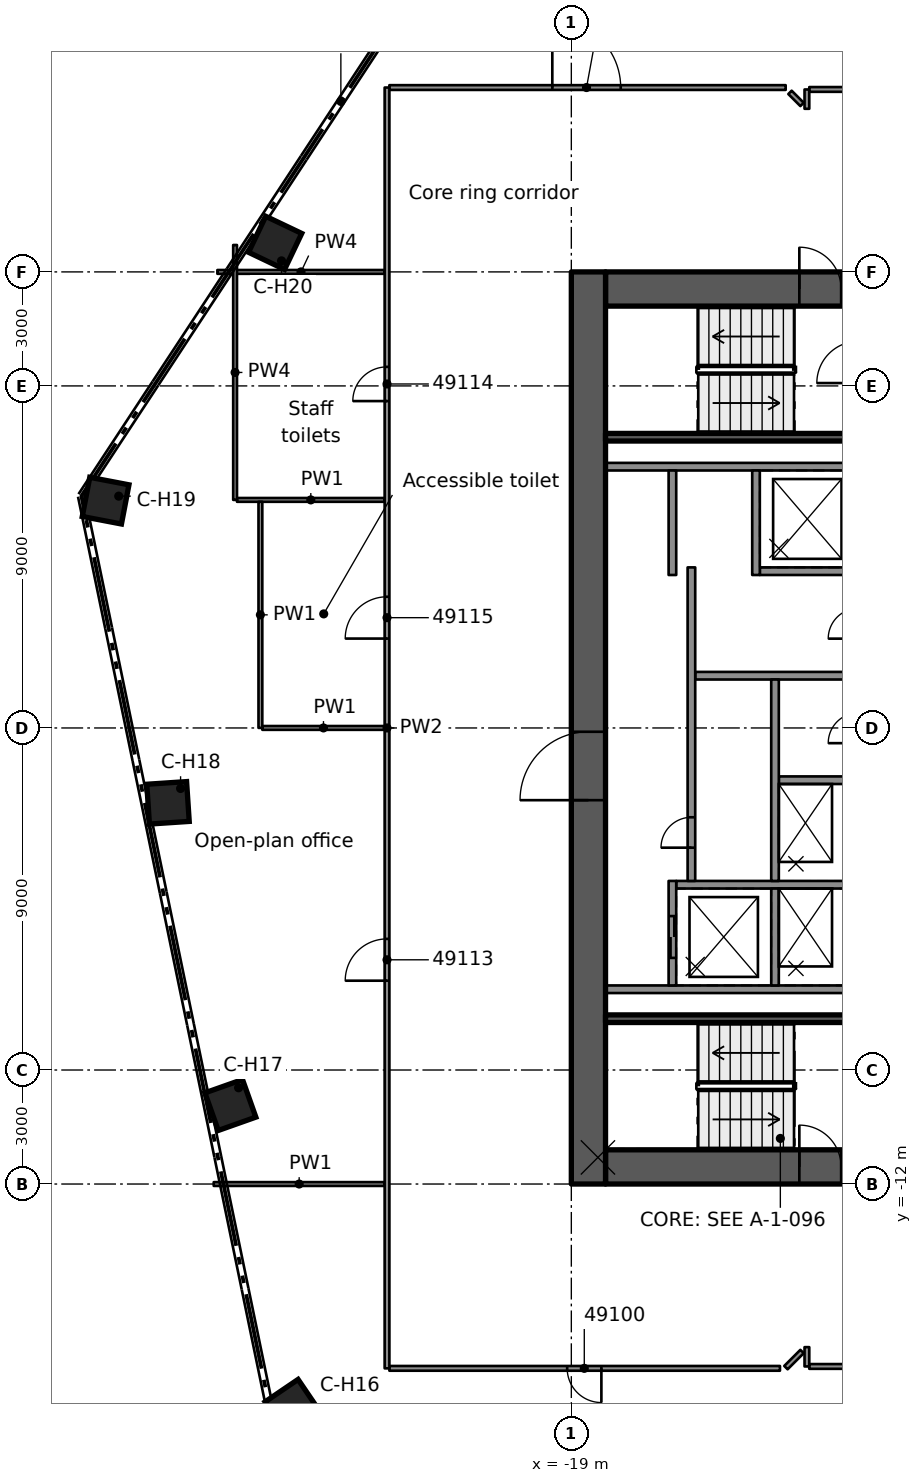
"""IFC4 building model, lengths in metres.
Left out: names, types, materials, properties, quantities, classifications, styles, units other than length and angle.
Written with IfcOpenShell. Run it as: python <this file> out.ifc"""

import sys

from ifc_helpers import new_model, si_unit, direction, frame, frame_2d, origin, origin_2d, place, context, subcontext, project, spatial, rectangle, extrude, element, fill, save


model = new_model("IFC4")
c1 = context("Model", 3, precision=1e-05, world=origin(), true_north=direction((0.0, 1.0)))
c2 = subcontext(c1, "Body", "Model", "MODEL_VIEW")
j1 = project(units=[si_unit("LENGTHUNIT", "METRE"), si_unit("PLANEANGLEUNIT", "RADIAN")], contexts=[c1])
p1 = place(None, origin())
s1 = spatial("IfcSite", under=j1, at=p1, CompositionType="ELEMENT")
p2 = place(p1, origin())
s2 = spatial("IfcBuilding", under=s1, at=p2, CompositionType="ELEMENT")
p3 = place(p2, frame((0.0, 0.0, 246.0)))
s3 = spatial("IfcBuildingStorey", under=s2, at=p3, CompositionType="ELEMENT", Elevation=246.0)
p4 = place(p3, frame((-18.1, 11.55, 0.0), z_axis=(0.0, 0.0, 1.0), x_axis=(1.0, 0.0, 0.0)))
e1 = element("IfcWall", 1, at=p4, inside=s3, PredefinedType="SHEAR", context=c2, shape_type="SweptSolid", body=[
    extrude(rectangle(XDim=9.2, YDim=0.9, at=frame_2d((4.6, 0.0))), origin(), (0.0, 0.0, 1.0), 3.5),
])
p5 = place(p4, frame((5.1, 0.0, 0.0)))
e2 = element("IfcOpeningElement", 2, at=p5, cuts=e1, PredefinedType="OPENING", context=c2, shape_type="SweptSolid", body=[
    extrude(rectangle(XDim=1.1, YDim=2.1, at=frame_2d((0.55, 1.05))), frame((0.0, 0.46, 0.0), z_axis=(0.0, -1.0, 0.0), x_axis=(1.0, 0.0, 0.0)), (0.0, 0.0, 1.0), 0.92),
])
p6 = place(p3, frame((-18.1, -11.55, 0.0), z_axis=(0.0, 0.0, 1.0), x_axis=(1.0, 0.0, 0.0)))
e3 = element("IfcWall", 3, at=p6, inside=s3, PredefinedType="SHEAR", context=c2, shape_type="SweptSolid", body=[
    extrude(rectangle(XDim=9.2, YDim=0.9, at=frame_2d((4.6, 0.0))), origin(), (0.0, 0.0, 1.0), 3.5),
])
p7 = place(p6, frame((5.1, 0.0, 0.0)))
e4 = element("IfcOpeningElement", 4, at=p7, cuts=e3, PredefinedType="OPENING", context=c2, shape_type="SweptSolid", body=[
    extrude(rectangle(XDim=1.1, YDim=2.1, at=frame_2d((0.55, 1.05))), frame((0.0, 0.46, 0.0), z_axis=(0.0, -1.0, 0.0), x_axis=(1.0, 0.0, 0.0)), (0.0, 0.0, 1.0), 0.92),
])
p8 = place(p6, frame((7.53, 0.0, 0.0)))
e5 = element("IfcOpeningElement", 5, at=p8, cuts=e3, PredefinedType="OPENING", context=c2, shape_type="SweptSolid", body=[
    extrude(rectangle(XDim=0.9, YDim=2.1, at=frame_2d((0.45, 1.05))), frame((0.0, 0.46, 0.0), z_axis=(0.0, -1.0, 0.0), x_axis=(1.0, 0.0, 0.0)), (0.0, 0.0, 1.0), 0.92),
])
p9 = place(p3, frame((-18.55, -12.0, 0.0), z_axis=(0.0, 0.0, 1.0), x_axis=(0.0, 1.0, 0.0)))
e6 = element("IfcWall", 6, at=p9, inside=s3, PredefinedType="SHEAR", context=c2, shape_type="SweptSolid", body=[
    extrude(rectangle(XDim=24.0, YDim=0.9, at=frame_2d((12.0, 0.0))), origin(), (0.0, 0.0, 1.0), 3.5),
])
p10 = place(p9, frame((10.1, 0.0, 0.0)))
e7 = element("IfcOpeningElement", 7, at=p10, cuts=e6, PredefinedType="OPENING", context=c2, shape_type="SweptSolid", body=[
    extrude(rectangle(XDim=1.8, YDim=2.1, at=frame_2d((0.9, 1.05))), frame((0.0, 0.46, 0.0), z_axis=(0.0, -1.0, 0.0), x_axis=(1.0, 0.0, 0.0)), (0.0, 0.0, 1.0), 0.92),
])
for number, where, z_axis, x_axis in (
    (8, (-26.33, -17.871, 0.0), (0.0, 0.0, 1.0), (-0.827, -0.562, 0.0)),
    (9, (-27.972, -9.921, 0.0), (0.0, 0.0, 1.0), (-0.942, -0.334, 0.0)),
    (10, (-29.613, -1.97, 0.0), (0.0, 0.0, 1.0), (-0.998, -0.066, 0.0)),
    (11, (-31.255, 5.981, 0.0), (0.0, 0.0, 1.0), (-0.982, 0.188, 0.0)),
    (12, (-26.794, 12.764, 0.0), (0.0, 0.0, 1.0), (-0.903, 0.43, 0.0)),
):
    element("IfcColumn", number, at=place(p3, frame(where, z_axis=z_axis, x_axis=x_axis)), inside=s3, PredefinedType="COLUMN", context=c2, shape_type="SweptSolid", body=[
        extrude(rectangle(XDim=1.05, YDim=1.05, at=origin_2d()), origin(), (0.0, 0.0, 1.0), 3.5),
    ])
for number, where, z_axis, x_axis in (
    (13, (-11.54, 6.875, 0.0), (0.0, 0.0, 1.0), (-1.0, 0.0, 0.0)),
    (14, (-11.54, -6.875, 0.0), (0.0, 0.0, 1.0), (-1.0, 0.0, 0.0)),
):
    element("IfcWall", number, at=place(p3, frame(where, z_axis=z_axis, x_axis=x_axis)), inside=s3, PredefinedType="SOLIDWALL", context=c2, shape_type="SweptSolid", body=[
        extrude(rectangle(XDim=6.56, YDim=0.2, at=frame_2d((3.28, 0.0))), origin(), (0.0, 0.0, 1.0), 3.08),
    ])
p11 = place(p3, frame((-11.54, -4.125, 0.0), z_axis=(0.0, 0.0, 1.0), x_axis=(-1.0, 0.0, 0.0)))
e15 = element("IfcWall", 15, at=p11, inside=s3, PredefinedType="SOLIDWALL", context=c2, shape_type="SweptSolid", body=[
    extrude(rectangle(XDim=4.7, YDim=0.2, at=frame_2d((2.35, 0.0))), origin(), (0.0, 0.0, 1.0), 3.08),
])
p12 = place(p3, frame((-11.54, -1.375, 0.0), z_axis=(0.0, 0.0, 1.0), x_axis=(-1.0, 0.0, 0.0)))
e16 = element("IfcWall", 16, at=p12, inside=s3, PredefinedType="SOLIDWALL", context=c2, shape_type="SweptSolid", body=[
    extrude(rectangle(XDim=2.0, YDim=0.2, at=frame_2d((1.0, 0.0))), origin(), (0.0, 0.0, 1.0), 3.08),
])
p13 = place(p3, frame((-11.54, 1.375, 0.0), z_axis=(0.0, 0.0, 1.0), x_axis=(-1.0, 0.0, 0.0)))
e17 = element("IfcWall", 17, at=p13, inside=s3, PredefinedType="SOLIDWALL", context=c2, shape_type="SweptSolid", body=[
    extrude(rectangle(XDim=4.2, YDim=0.2, at=frame_2d((2.1, 0.0))), origin(), (0.0, 0.0, 1.0), 3.08),
])
p14 = place(p3, frame((-11.54, 4.125, 0.0), z_axis=(0.0, 0.0, 1.0), x_axis=(-1.0, 0.0, 0.0)))
e18 = element("IfcWall", 18, at=p14, inside=s3, PredefinedType="SOLIDWALL", context=c2, shape_type="SweptSolid", body=[
    extrude(rectangle(XDim=2.5, YDim=0.2, at=frame_2d((1.25, 0.0))), origin(), (0.0, 0.0, 1.0), 3.08),
])
p15 = place(p3, frame((-13.64, -6.775, 0.0), z_axis=(0.0, 0.0, 1.0), x_axis=(0.0, 1.0, 0.0)))
e19 = element("IfcWall", 19, at=p15, inside=s3, PredefinedType="SOLIDWALL", context=c2, shape_type="SweptSolid", body=[
    extrude(rectangle(XDim=2.55, YDim=0.2, at=frame_2d((1.275, 0.0))), origin(), (0.0, 0.0, 1.0), 3.08),
])
p16 = place(p3, frame((-13.64, -4.025, 0.0), z_axis=(0.0, 0.0, 1.0), x_axis=(0.0, 1.0, 0.0)))
e20 = element("IfcWall", 20, at=p16, inside=s3, PredefinedType="SOLIDWALL", context=c2, shape_type="SweptSolid", body=[
    extrude(rectangle(XDim=5.3, YDim=0.2, at=frame_2d((2.65, 0.0))), origin(), (0.0, 0.0, 1.0), 3.08),
])
p17 = place(p3, frame((-14.14, 4.025, 0.0), z_axis=(0.0, 0.0, 1.0), x_axis=(0.0, 1.0, 0.0)))
e21 = element("IfcWall", 21, at=p17, inside=s3, PredefinedType="SOLIDWALL", context=c2, shape_type="SweptSolid", body=[
    extrude(rectangle(XDim=2.75, YDim=0.2, at=frame_2d((1.375, 0.0))), origin(), (0.0, 0.0, 1.0), 3.08),
])
p18 = place(p3, frame((-16.34, -6.775, 0.0), z_axis=(0.0, 0.0, 1.0), x_axis=(0.0, 1.0, 0.0)))
e22 = element("IfcWall", 22, at=p18, inside=s3, PredefinedType="SOLIDWALL", context=c2, shape_type="SweptSolid", body=[
    extrude(rectangle(XDim=2.75, YDim=0.2, at=frame_2d((1.375, 0.0))), origin(), (0.0, 0.0, 1.0), 3.08),
])
p19 = place(p18, frame((0.725, 0.0, 0.0)))
e23 = element("IfcOpeningElement", 23, at=p19, cuts=e22, PredefinedType="OPENING", context=c2, shape_type="SweptSolid", body=[
    extrude(rectangle(XDim=1.1, YDim=2.1, at=frame_2d((0.55, 1.05))), frame((0.0, 0.11, 0.0), z_axis=(0.0, -1.0, 0.0), x_axis=(1.0, 0.0, 0.0)), (0.0, 0.0, 1.0), 0.22),
])
p20 = place(p3, frame((-15.84, -4.025, 0.0), z_axis=(0.0, 0.0, 1.0), x_axis=(0.0, 1.0, 0.0)))
e24 = element("IfcWall", 24, at=p20, inside=s3, PredefinedType="SOLIDWALL", context=c2, shape_type="SweptSolid", body=[
    extrude(rectangle(XDim=8.25, YDim=0.2, at=frame_2d((4.125, 0.0))), origin(), (0.0, 0.0, 1.0), 3.08),
])
p21 = place(p20, frame((0.875, 0.0, 0.0)))
e25 = element("IfcOpeningElement", 25, at=p21, cuts=e24, PredefinedType="OPENING", context=c2, shape_type="SweptSolid", body=[
    extrude(rectangle(XDim=0.8, YDim=2.1, at=frame_2d((0.4, 1.05))), frame((0.0, 0.11, 0.0), z_axis=(0.0, -1.0, 0.0), x_axis=(1.0, 0.0, 0.0)), (0.0, 0.0, 1.0), 0.22),
])
p22 = place(p3, frame((-16.34, 4.025, 0.0), z_axis=(0.0, 0.0, 1.0), x_axis=(0.0, 1.0, 0.0)))
e26 = element("IfcWall", 26, at=p22, inside=s3, PredefinedType="SOLIDWALL", context=c2, shape_type="SweptSolid", body=[
    extrude(rectangle(XDim=2.75, YDim=0.2, at=frame_2d((1.375, 0.0))), origin(), (0.0, 0.0, 1.0), 3.08),
])
for number, where, z_axis, x_axis in (
    (27, (-11.54, 7.65, 0.0), (0.0, 0.0, 1.0), (-1.0, 0.0, 0.0)),
    (28, (-11.54, -7.65, 0.0), (0.0, 0.0, 1.0), (-1.0, 0.0, 0.0)),
):
    element("IfcWall", number, at=place(p3, frame(where, z_axis=z_axis, x_axis=x_axis)), inside=s3, PredefinedType="SOLIDWALL", context=c2, shape_type="SweptSolid", body=[
        extrude(rectangle(XDim=6.56, YDim=0.2, at=frame_2d((3.28, 0.0))), origin(), (0.0, 0.0, 1.0), 3.08),
    ])
p23 = place(p3, frame((-13.246, 16.724, 0.0), z_axis=(0.0, 0.0, 1.0), x_axis=(0.707106781187, -0.707106781187, 0.0)))
e29 = element("IfcWall", 29, at=p23, inside=s3, PredefinedType="PARTITIONING", context=c2, shape_type="SweptSolid", body=[
    extrude(rectangle(XDim=0.448, YDim=0.125, at=frame_2d((0.224, 0.0))), origin(), (0.0, 0.0, 1.0), 3.06),
])
p24 = place(p3, frame((-13.51, -16.85, 0.0), z_axis=(0.0, 0.0, 1.0), x_axis=(-1.0, 0.0, 0.0)))
e30 = element("IfcWall", 30, at=p24, inside=s3, PredefinedType="PARTITIONING", context=c2, shape_type="SweptSolid", body=[
    extrude(rectangle(XDim=10.278, YDim=0.125, at=frame_2d((5.139, 0.0))), origin(), (0.0, 0.0, 1.0), 3.06),
])
p25 = place(p24, frame((4.699, 0.0, 0.0)))
e31 = element("IfcOpeningElement", 31, at=p25, cuts=e30, PredefinedType="OPENING", context=c2, shape_type="SweptSolid", body=[
    extrude(rectangle(XDim=0.9, YDim=2.1, at=frame_2d((0.45, 1.05))), frame((0.0, 0.073, 0.0), z_axis=(0.0, -1.0, 0.0), x_axis=(1.0, 0.0, 0.0)), (0.0, 0.0, 1.0), 0.145),
])
p26 = place(p3, frame((12.739, -16.8, 0.0), z_axis=(0.0, 0.0, 1.0), x_axis=(-1.0, 0.0, 0.0)))
e32 = element("IfcWall", 32, at=p26, inside=s3, PredefinedType="PARTITIONING", context=c2, shape_type="SweptSolid", body=[
    extrude(rectangle(XDim=25.478, YDim=0.125, at=frame_2d((12.739, 0.0))), origin(), (0.0, 0.0, 1.0), 3.06),
])
p27 = place(p26, frame((15.088, 0.0, 0.0)))
e33 = element("IfcOpeningElement", 33, at=p27, cuts=e32, PredefinedType="OPENING", context=c2, shape_type="SweptSolid", body=[
    extrude(rectangle(XDim=1.8, YDim=2.1, at=frame_2d((0.9, 1.05))), frame((0.0, 0.073, 0.0), z_axis=(0.0, -1.0, 0.0), x_axis=(1.0, 0.0, 0.0)), (0.0, 0.0, 1.0), 0.145),
])
p28 = place(p26, frame((9.189, 0.0, 0.0)))
e34 = element("IfcOpeningElement", 34, at=p28, cuts=e32, PredefinedType="OPENING", context=c2, shape_type="SweptSolid", body=[
    extrude(rectangle(XDim=0.9, YDim=2.1, at=frame_2d((0.45, 1.05))), frame((0.0, 0.073, 0.0), z_axis=(0.0, -1.0, 0.0), x_axis=(1.0, 0.0, 0.0)), (0.0, 0.0, 1.0), 0.145),
])
p29 = place(p3, frame((-28.41, -12.0, 0.0), z_axis=(0.0, 0.0, 1.0), x_axis=(1.0, 0.0, 0.0)))
e35 = element("IfcWall", 35, at=p29, inside=s3, PredefinedType="PARTITIONING", context=c2, shape_type="SweptSolid", body=[
    extrude(rectangle(XDim=4.497, YDim=0.1, at=frame_2d((2.249, 0.0))), origin(), (0.0, 0.0, 1.0), 3.06),
])
p30 = place(p3, frame((-27.131, 0.001, 0.0), z_axis=(0.0, 0.0, 1.0), x_axis=(1.0, 0.0, 0.0)))
e36 = element("IfcWall", 36, at=p30, inside=s3, PredefinedType="PARTITIONING", context=c2, shape_type="SweptSolid", body=[
    extrude(rectangle(XDim=3.218, YDim=0.1, at=frame_2d((1.609, 0.0))), origin(), (0.0, 0.0, 1.0), 3.06),
])
p31 = place(p3, frame((-27.798, 6.001, 0.0), z_axis=(0.0, 0.0, 1.0), x_axis=(1.0, 0.0, 0.0)))
e37 = element("IfcWall", 37, at=p31, inside=s3, PredefinedType="PARTITIONING", context=c2, shape_type="SweptSolid", body=[
    extrude(rectangle(XDim=3.885, YDim=0.1, at=frame_2d((1.942, 0.0))), origin(), (0.0, 0.0, 1.0), 3.06),
])
p32 = place(p3, frame((-28.314, 12.0, 0.0), z_axis=(0.0, 0.0, 1.0), x_axis=(1.0, 0.0, 0.0)))
e38 = element("IfcWall", 38, at=p32, inside=s3, PredefinedType="PARTITIONING", context=c2, shape_type="SweptSolid", body=[
    extrude(rectangle(XDim=4.401, YDim=0.1, at=frame_2d((2.2, 0.0))), origin(), (0.0, 0.0, 1.0), 2.425),
])
p33 = place(p3, frame((-12.738, 16.801, 0.0), z_axis=(0.0, 0.0, 1.0), x_axis=(1.0, 0.0, 0.0)))
e39 = element("IfcWall", 39, at=p33, inside=s3, PredefinedType="PARTITIONING", context=c2, shape_type="SweptSolid", body=[
    extrude(rectangle(XDim=25.476, YDim=0.125, at=frame_2d((12.738, 0.0))), origin(), (0.0, 0.0, 1.0), 3.06),
])
p34 = place(p33, frame((15.337, 0.0, 0.0)))
e40 = element("IfcOpeningElement", 40, at=p34, cuts=e39, PredefinedType="OPENING", context=c2, shape_type="SweptSolid", body=[
    extrude(rectangle(XDim=1.1, YDim=2.1, at=frame_2d((0.55, 1.05))), frame((0.0, 0.073, 0.0), z_axis=(0.0, -1.0, 0.0), x_axis=(1.0, 0.0, 0.0)), (0.0, 0.0, 1.0), 0.145),
])
p35 = place(p33, frame((8.938, 0.0, 0.0)))
e41 = element("IfcOpeningElement", 41, at=p35, cuts=e39, PredefinedType="OPENING", context=c2, shape_type="SweptSolid", body=[
    extrude(rectangle(XDim=1.1, YDim=2.1, at=frame_2d((0.55, 1.05))), frame((0.0, 0.073, 0.0), z_axis=(0.0, -1.0, 0.0), x_axis=(1.0, 0.0, 0.0)), (0.0, 0.0, 1.0), 0.145),
])
p36 = place(p3, frame((-23.788, 16.851, 0.0), z_axis=(0.0, 0.0, 1.0), x_axis=(1.0, 0.0, 0.0)))
e42 = element("IfcWall", 42, at=p36, inside=s3, PredefinedType="PARTITIONING", context=c2, shape_type="SweptSolid", body=[
    extrude(rectangle(XDim=10.428, YDim=0.125, at=frame_2d((5.214, 0.0))), origin(), (0.0, 0.0, 1.0), 3.06),
])
p37 = place(p36, frame((4.288, 0.0, 0.0)))
e43 = element("IfcOpeningElement", 43, at=p37, cuts=e42, PredefinedType="OPENING", context=c2, shape_type="SweptSolid", body=[
    extrude(rectangle(XDim=1.8, YDim=2.1, at=frame_2d((0.9, 1.05))), frame((0.0, 0.073, 0.0), z_axis=(0.0, -1.0, 0.0), x_axis=(1.0, 0.0, 0.0)), (0.0, 0.0, 1.0), 0.145),
])
p38 = place(p3, frame((-13.353, -16.831, 0.0), z_axis=(0.0, 0.0, 1.0), x_axis=(0.707106781187, 0.707106781187, 0.0)))
e44 = element("IfcWall", 44, at=p38, inside=s3, PredefinedType="PARTITIONING", context=c2, shape_type="SweptSolid", body=[
    extrude(rectangle(XDim=0.6, YDim=0.125, at=frame_2d((0.3, 0.0))), origin(), (0.0, 0.0, 1.0), 3.06),
])
for number, where, z_axis, x_axis in (
    (45, (-12.801, -16.8, 0.0), (0.0, 0.0, 1.0), (0.0, 1.0, 0.0)),
    (46, (-12.801, 16.292, 0.0), (0.0, 0.0, 1.0), (0.0, 1.0, 0.0)),
):
    element("IfcWall", number, at=place(p3, frame(where, z_axis=z_axis, x_axis=x_axis)), inside=s3, PredefinedType="PARTITIONING", context=c2, shape_type="SweptSolid", body=[
        extrude(rectangle(XDim=0.508, YDim=0.125, at=frame_2d((0.254, 0.0))), origin(), (0.0, 0.0, 1.0), 3.06),
    ])
p39 = place(p3, frame((-23.85, -16.85, 0.0), z_axis=(0.0, 0.0, 1.0), x_axis=(0.0, 1.0, 0.0)))
e47 = element("IfcWall", 47, at=p39, inside=s3, PredefinedType="PARTITIONING", context=c2, shape_type="SweptSolid", body=[
    extrude(rectangle(XDim=33.701, YDim=0.125, at=frame_2d((16.851, 0.0))), origin(), (0.0, 0.0, 1.0), 3.06),
])
p40 = place(p39, frame((10.2, 0.0, 0.0)))
e48 = element("IfcOpeningElement", 48, at=p40, cuts=e47, PredefinedType="OPENING", context=c2, shape_type="SweptSolid", body=[
    extrude(rectangle(XDim=1.1, YDim=2.1, at=frame_2d((0.55, 1.05))), frame((0.0, 0.073, 0.0), z_axis=(0.0, -1.0, 0.0), x_axis=(1.0, 0.0, 0.0)), (0.0, 0.0, 1.0), 0.145),
])
p41 = place(p39, frame((25.451, 0.0, 0.0)))
e49 = element("IfcOpeningElement", 49, at=p41, cuts=e47, PredefinedType="OPENING", context=c2, shape_type="SweptSolid", body=[
    extrude(rectangle(XDim=0.9, YDim=2.1, at=frame_2d((0.45, 1.05))), frame((0.0, 0.073, 0.0), z_axis=(0.0, -1.0, 0.0), x_axis=(1.0, 0.0, 0.0)), (0.0, 0.0, 1.0), 0.145),
])
p42 = place(p39, frame((19.202, 0.0, 0.0)))
e50 = element("IfcOpeningElement", 50, at=p42, cuts=e47, PredefinedType="OPENING", context=c2, shape_type="SweptSolid", body=[
    extrude(rectangle(XDim=1.1, YDim=2.1, at=frame_2d((0.55, 1.05))), frame((0.0, 0.073, 0.0), z_axis=(0.0, -1.0, 0.0), x_axis=(1.0, 0.0, 0.0)), (0.0, 0.0, 1.0), 0.145),
])
p43 = place(p3, frame((-27.182, 0.002, 0.0), z_axis=(0.0, 0.0, 1.0), x_axis=(0.0, 1.0, 0.0)))
e51 = element("IfcWall", 51, at=p43, inside=s3, PredefinedType="PARTITIONING", context=c2, shape_type="SweptSolid", body=[
    extrude(rectangle(XDim=5.949, YDim=0.1, at=frame_2d((2.975, 0.0))), origin(), (0.0, 0.0, 1.0), 3.06),
])
p44 = place(p3, frame((-27.848, 6.001, 0.0), z_axis=(0.0, 0.0, 1.0), x_axis=(0.0, 1.0, 0.0)))
e52 = element("IfcWall", 52, at=p44, inside=s3, PredefinedType="PARTITIONING", context=c2, shape_type="SweptSolid", body=[
    extrude(rectangle(XDim=6.707, YDim=0.1, at=frame_2d((3.354, 0.0))), origin(), (0.0, 0.0, 1.0), 2.425),
])
p45 = place(p19, origin())
e53 = element("IfcDoor", 53, at=p45, inside=s3, OperationType="DOUBLE_DOOR_SLIDING", PredefinedType="DOOR", context=c2, shape_type="SweptSolid", body=[
    extrude(rectangle(XDim=1.1, YDim=2.1, at=frame_2d((0.55, 1.05))), frame((0.0, 0.025, 0.0), z_axis=(0.0, -1.0, 0.0), x_axis=(1.0, 0.0, 0.0)), (0.0, 0.0, 1.0), 0.05),
])
fill(e23, e53)
p46 = place(p21, origin())
e54 = element("IfcDoor", 54, at=p46, inside=s3, OperationType="SINGLE_SWING_LEFT", PredefinedType="DOOR", context=c2, shape_type="SweptSolid", body=[
    extrude(rectangle(XDim=0.8, YDim=2.1, at=frame_2d((0.4, 1.05))), frame((0.0, 0.025, 0.0), z_axis=(0.0, -1.0, 0.0), x_axis=(1.0, 0.0, 0.0)), (0.0, 0.0, 1.0), 0.05),
])
fill(e25, e54)
p47 = place(p10, origin())
e55 = element("IfcDoor", 55, at=p47, inside=s3, OperationType="SINGLE_SWING_LEFT", PredefinedType="DOOR", context=c2, shape_type="SweptSolid", body=[
    extrude(rectangle(XDim=1.8, YDim=2.1, at=frame_2d((0.9, 1.05))), frame((0.0, 0.025, 0.0), z_axis=(0.0, -1.0, 0.0), x_axis=(1.0, 0.0, 0.0)), (0.0, 0.0, 1.0), 0.05),
])
fill(e7, e55)
p48 = place(p5, origin())
e56 = element("IfcDoor", 56, at=p48, inside=s3, OperationType="SINGLE_SWING_RIGHT", PredefinedType="DOOR", context=c2, shape_type="SweptSolid", body=[
    extrude(rectangle(XDim=1.1, YDim=2.1, at=frame_2d((0.55, 1.05))), frame((0.0, 0.025, 0.0), z_axis=(0.0, -1.0, 0.0), x_axis=(1.0, 0.0, 0.0)), (0.0, 0.0, 1.0), 0.05),
])
fill(e2, e56)
p49 = place(p7, origin())
e57 = element("IfcDoor", 57, at=p49, inside=s3, OperationType="SINGLE_SWING_RIGHT", PredefinedType="DOOR", context=c2, shape_type="SweptSolid", body=[
    extrude(rectangle(XDim=1.1, YDim=2.1, at=frame_2d((0.55, 1.05))), frame((0.0, 0.025, 0.0), z_axis=(0.0, -1.0, 0.0), x_axis=(1.0, 0.0, 0.0)), (0.0, 0.0, 1.0), 0.05),
])
fill(e4, e57)
p50 = place(p25, origin())
e58 = element("IfcDoor", 58, at=p50, inside=s3, OperationType="SINGLE_SWING_RIGHT", PredefinedType="DOOR", context=c2, shape_type="SweptSolid", body=[
    extrude(rectangle(XDim=0.9, YDim=2.1, at=frame_2d((0.45, 1.05))), frame((0.0, 0.025, 0.0), z_axis=(0.0, -1.0, 0.0), x_axis=(1.0, 0.0, 0.0)), (0.0, 0.0, 1.0), 0.05),
])
fill(e31, e58)
p51 = place(p37, origin())
e59 = element("IfcDoor", 59, at=p51, inside=s3, OperationType="DOUBLE_DOOR_SINGLE_SWING", PredefinedType="DOOR", context=c2, shape_type="SweptSolid", body=[
    extrude(rectangle(XDim=1.8, YDim=2.1, at=frame_2d((0.9, 1.05))), frame((0.0, 0.025, 0.0), z_axis=(0.0, -1.0, 0.0), x_axis=(1.0, 0.0, 0.0)), (0.0, 0.0, 1.0), 0.05),
])
fill(e43, e59)
p52 = place(p40, origin())
e60 = element("IfcDoor", 60, at=p52, inside=s3, OperationType="SINGLE_SWING_LEFT", PredefinedType="DOOR", context=c2, shape_type="SweptSolid", body=[
    extrude(rectangle(XDim=1.1, YDim=2.1, at=frame_2d((0.55, 1.05))), frame((0.0, 0.025, 0.0), z_axis=(0.0, -1.0, 0.0), x_axis=(1.0, 0.0, 0.0)), (0.0, 0.0, 1.0), 0.05),
])
fill(e48, e60)
p53 = place(p41, origin())
e61 = element("IfcDoor", 61, at=p53, inside=s3, OperationType="SINGLE_SWING_RIGHT", PredefinedType="DOOR", context=c2, shape_type="SweptSolid", body=[
    extrude(rectangle(XDim=0.9, YDim=2.1, at=frame_2d((0.45, 1.05))), frame((0.0, 0.025, 0.0), z_axis=(0.0, -1.0, 0.0), x_axis=(1.0, 0.0, 0.0)), (0.0, 0.0, 1.0), 0.05),
])
fill(e49, e61)
p54 = place(p42, origin())
e62 = element("IfcDoor", 62, at=p54, inside=s3, OperationType="SINGLE_SWING_RIGHT", PredefinedType="DOOR", context=c2, shape_type="SweptSolid", body=[
    extrude(rectangle(XDim=1.1, YDim=2.1, at=frame_2d((0.55, 1.05))), frame((0.0, 0.025, 0.0), z_axis=(0.0, -1.0, 0.0), x_axis=(1.0, 0.0, 0.0)), (0.0, 0.0, 1.0), 0.05),
])
fill(e50, e62)
save(model, sys.argv[1])
